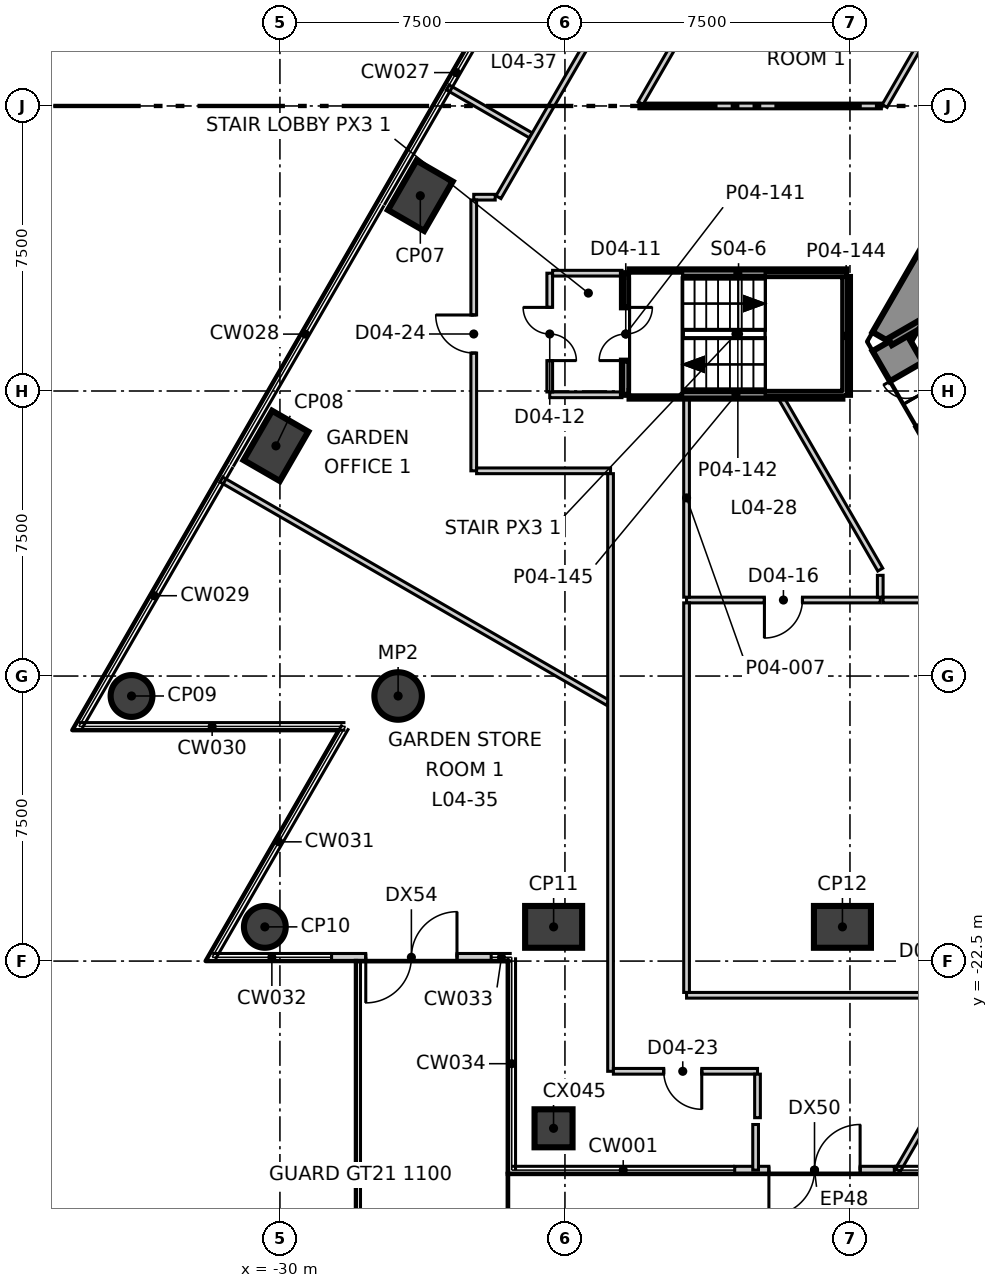
"""IFC4 building model, lengths in metres.
Left out: names, types, materials, properties, quantities, classifications, styles, units other than length and angle.
Written with IfcOpenShell. Run it as: python <this file> out.ifc"""

import sys

from ifc_helpers import new_model, si_unit, direction, frame, frame_2d, origin, origin_2d, place, context, subcontext, project, spatial, polyline, rectangle, circle, outline, extrude, element, fill, save


model = new_model("IFC4")
c1 = context("Model", 3, precision=1e-05, world=origin(), true_north=direction((0.0, 1.0)))
c2 = subcontext(c1, "Body", "Model", "MODEL_VIEW")
j1 = project(units=[si_unit("LENGTHUNIT", "METRE"), si_unit("PLANEANGLEUNIT", "RADIAN")], contexts=[c1])
p1 = place(None, origin())
s1 = spatial("IfcSite", under=j1, at=p1, CompositionType="ELEMENT")
p2 = place(p1, origin())
s2 = spatial("IfcBuilding", under=s1, at=p2, CompositionType="ELEMENT")
p3 = place(p2, frame((0.0, 0.0, 25.3)))
s3 = spatial("IfcBuildingStorey", under=s2, at=p3, CompositionType="ELEMENT", Elevation=25.3)
p4 = place(p3, frame((-1.617, 15.2, -0.4), z_axis=(0.0, 0.0, 1.0), x_axis=(-0.499992141631, -0.866029940768, 0.0)))
e1 = element("IfcWall", 1, at=p4, inside=s3, PredefinedType="SHEAR", context=c2, shape_type="SweptSolid", body=[
    extrude(outline(polyline([(-0.289, -0.499), (1.656, -0.499), (3.601, -0.499), (5.547, -0.499), (7.492, -0.499), (9.437, -0.5), (11.382, -0.5), (13.328, -0.5), (15.273, -0.5), (17.218, -0.5), (19.163, -0.5), (21.109, -0.5), (23.054, -0.5), (24.999, -0.5), (24.422, 0.5), (22.566, 0.5), (20.709, 0.5), (18.853, 0.5), (16.997, 0.5), (15.14, 0.5), (13.284, 0.5), (11.427, 0.5), (9.571, 0.5), (7.715, 0.5), (5.858, 0.5), (4.002, 0.5), (2.146, 0.5), (0.289, 0.5), (-0.289, -0.499)])), origin(), (0.0, 0.0, 1.0), 5.0),
])
p5 = place(p4, frame((11.805, 0.0, 0.4)))
e2 = element("IfcOpeningElement", 2, at=p5, cuts=e1, PredefinedType="OPENING", context=c2, shape_type="SweptSolid", body=[
    extrude(rectangle(XDim=1.1, YDim=2.1, at=frame_2d((0.55, 1.05))), frame((0.0, 0.51, 0.0), z_axis=(0.0, -1.0, 0.0), x_axis=(1.0, 0.0, 0.0)), (0.0, 0.0, 1.0), 1.02),
])
p6 = place(p3, frame((-13.972, -6.2, -0.4), z_axis=(0.0, 0.0, 1.0), x_axis=(0.500077567175, -0.865980615723, 0.0)))
e3 = element("IfcWall", 3, at=p6, inside=s3, PredefinedType="SHEAR", context=c2, shape_type="SweptSolid", body=[
    extrude(outline(polyline([(-0.289, -0.5), (1.616, -0.5), (3.522, -0.5), (2.944, 0.499), (1.617, 0.5), (0.289, 0.5), (-0.289, -0.5)])), origin(), (0.0, 0.0, 1.0), 5.0),
])
p7 = place(p6, frame((0.917, 0.0, 0.4)))
e4 = element("IfcOpeningElement", 4, at=p7, cuts=e3, PredefinedType="OPENING", context=c2, shape_type="SweptSolid", body=[
    extrude(rectangle(XDim=1.4, YDim=2.1, at=frame_2d((0.7, 1.05))), frame((0.0, 0.51, 0.0), z_axis=(0.0, -1.0, 0.0), x_axis=(1.0, 0.0, 0.0)), (0.0, 0.0, 1.0), 1.02),
])
for number, where, z_axis, x_axis in (
    (5, (-26.306, -2.362, -0.4), (0.0, 0.0, 1.0), (0.5, 0.866, 0.0)),
    (6, (-30.105, -8.944, -0.4), (0.0, 0.0, 1.0), (0.5, 0.866, 0.0)),
):
    element("IfcColumn", number, at=place(p3, frame(where, z_axis=z_axis, x_axis=x_axis)), inside=s3, PredefinedType="COLUMN", context=c2, shape_type="SweptSolid", body=[
        extrude(rectangle(XDim=1.5, YDim=1.1, at=origin_2d()), origin(), (0.0, 0.0, 1.0), 5.0),
    ])
for number, where, z_axis, x_axis in (
    (7, (-33.905, -15.525, -0.4), (0.0, 0.0, 1.0), (0.5, 0.866, 0.0)),
    (8, (-30.397, -21.6, -0.4), (0.0, 0.0, 1.0), (1.0, 0.0, 0.0)),
):
    element("IfcColumn", number, at=place(p3, frame(where, z_axis=z_axis, x_axis=x_axis)), inside=s3, PredefinedType="COLUMN", context=c2, shape_type="SweptSolid", body=[
        extrude(circle(Radius=0.55, at=origin_2d()), origin(), (0.0, 0.0, 1.0), 5.0),
    ])
for number, where, z_axis, x_axis in (
    (9, (-22.798, -21.6, -0.4), (0.0, 0.0, 1.0), (1.0, 0.0, 0.0)),
    (10, (-15.198, -21.6, -0.4), (0.0, 0.0, 1.0), (1.0, 0.0, 0.0)),
):
    element("IfcColumn", number, at=place(p3, frame(where, z_axis=z_axis, x_axis=x_axis)), inside=s3, PredefinedType="COLUMN", context=c2, shape_type="SweptSolid", body=[
        extrude(rectangle(XDim=1.5, YDim=1.1, at=origin_2d()), origin(), (0.0, 0.0, 1.0), 5.0),
    ])
p8 = place(p3, frame((-26.89, -15.525, -0.4), z_axis=(0.0, 0.0, 1.0), x_axis=(1.0, 0.0, 0.0)))
e11 = element("IfcColumn", 11, at=p8, inside=s3, PredefinedType="COLUMN", context=c2, shape_type="SweptSolid", body=[
    extrude(circle(Radius=0.625, at=origin_2d()), origin(), (0.0, 0.0, 1.0), 5.0),
])
p9 = place(p3, frame((-22.8, -26.9, -0.4), z_axis=(0.0, 0.0, 1.0), x_axis=(1.0, 0.0, 0.0)))
e12 = element("IfcColumn", 12, at=p9, inside=s3, PredefinedType="COLUMN", context=c2, shape_type="SweptSolid", body=[
    extrude(rectangle(XDim=1.0, YDim=1.0, at=origin_2d()), origin(), (0.0, 0.0, 1.0), 5.0),
])
p10 = place(p3, frame((-18.033, -28.0, 0.0), z_axis=(0.0, 0.0, 1.0), x_axis=(1.0, 0.0, 0.0)))
e13 = element("IfcWall", 13, at=p10, inside=s3, PredefinedType="ELEMENTEDWALL", context=c2, shape_type="SweptSolid", body=[
    extrude(rectangle(XDim=4.2, YDim=0.2, at=frame_2d((2.1, 0.0))), origin(), (0.0, 0.0, 1.0), 4.6),
])
p11 = place(p10, frame((0.9, 0.0, 0.0)))
e14 = element("IfcOpeningElement", 14, at=p11, cuts=e13, PredefinedType="OPENING", context=c2, shape_type="SweptSolid", body=[
    extrude(rectangle(XDim=2.4, YDim=2.4, at=frame_2d((1.2, 1.2))), frame((0.0, 0.11, 0.0), z_axis=(0.0, -1.0, 0.0), x_axis=(1.0, 0.0, 0.0)), (0.0, 0.0, 1.0), 0.22),
])
p12 = place(p3, frame((-28.641, -22.4, 0.0), z_axis=(0.0, 0.0, 1.0), x_axis=(1.0, 0.0, 0.0)))
e15 = element("IfcWall", 15, at=p12, inside=s3, PredefinedType="ELEMENTEDWALL", context=c2, shape_type="SweptSolid", body=[
    extrude(rectangle(XDim=4.2, YDim=0.2, at=frame_2d((2.1, 0.0))), origin(), (0.0, 0.0, 1.0), 4.6),
])
p13 = place(p12, frame((0.9, 0.0, 0.0)))
e16 = element("IfcOpeningElement", 16, at=p13, cuts=e15, PredefinedType="OPENING", context=c2, shape_type="SweptSolid", body=[
    extrude(rectangle(XDim=2.4, YDim=2.4, at=frame_2d((1.2, 1.2))), frame((0.0, 0.11, 0.0), z_axis=(0.0, -1.0, 0.0), x_axis=(1.0, 0.0, 0.0)), (0.0, 0.0, 1.0), 0.22),
])
p14 = place(p3, frame((-22.9, -7.6, 0.0), z_axis=(0.0, 0.0, 1.0), x_axis=(1.0, 0.0, 0.0)))
e17 = element("IfcWall", 17, at=p14, inside=s3, PredefinedType="PARTITIONING", context=c2, shape_type="SweptSolid", body=[
    extrude(rectangle(XDim=1.9, YDim=0.15, at=frame_2d((0.95, 0.0))), origin(), (0.0, 0.0, 1.0), 4.6),
])
p15 = place(p3, frame((-22.9, -7.525, 0.0), z_axis=(0.0, 0.0, 1.0), x_axis=(0.0, 1.0, 0.0)))
e18 = element("IfcWall", 18, at=p15, inside=s3, PredefinedType="PARTITIONING", context=c2, shape_type="SweptSolid", body=[
    extrude(rectangle(XDim=3.125, YDim=0.15, at=frame_2d((1.562, 0.0))), origin(), (0.0, 0.0, 1.0), 4.6),
])
p16 = place(p15, frame((0.825, 0.0, 0.0)))
e19 = element("IfcOpeningElement", 19, at=p16, cuts=e18, PredefinedType="OPENING", context=c2, shape_type="SweptSolid", body=[
    extrude(rectangle(XDim=1.4, YDim=2.1, at=frame_2d((0.7, 1.05))), frame((0.0, 0.085, 0.0), z_axis=(0.0, -1.0, 0.0), x_axis=(1.0, 0.0, 0.0)), (0.0, 0.0, 1.0), 0.17),
])
p17 = place(p3, frame((-22.825, -4.4, 0.0), z_axis=(0.0, 0.0, 1.0), x_axis=(1.0, 0.0, 0.0)))
e20 = element("IfcWall", 20, at=p17, inside=s3, PredefinedType="PARTITIONING", context=c2, shape_type="SweptSolid", body=[
    extrude(rectangle(XDim=1.825, YDim=0.15, at=frame_2d((0.913, 0.0))), origin(), (0.0, 0.0, 1.0), 4.6),
])
p18 = place(p3, frame((-19.3, -13.0, 0.0), z_axis=(0.0, 0.0, 1.0), x_axis=(1.0, 0.0, 0.0)))
e21 = element("IfcWall", 21, at=p18, inside=s3, PredefinedType="PARTITIONING", context=c2, shape_type="SweptSolid", body=[
    extrude(rectangle(XDim=5.097, YDim=0.15, at=frame_2d((2.549, 0.0))), origin(), (0.0, 0.0, 1.0), 4.6),
])
p19 = place(p18, frame((2.049, 0.0, 0.0)))
e22 = element("IfcOpeningElement", 22, at=p19, cuts=e21, PredefinedType="OPENING", context=c2, shape_type="SweptSolid", body=[
    extrude(rectangle(XDim=1.0, YDim=2.1, at=frame_2d((0.5, 1.05))), frame((0.0, 0.085, 0.0), z_axis=(0.0, -1.0, 0.0), x_axis=(1.0, 0.0, 0.0)), (0.0, 0.0, 1.0), 0.17),
])
p20 = place(p3, frame((-19.3, -12.925, 0.0), z_axis=(0.0, 0.0, 1.0), x_axis=(0.0, 1.0, 0.0)))
e23 = element("IfcWall", 23, at=p20, inside=s3, PredefinedType="PARTITIONING", context=c2, shape_type="SweptSolid", body=[
    extrude(rectangle(XDim=5.225, YDim=0.15, at=frame_2d((2.613, 0.0))), origin(), (0.0, 0.0, 1.0), 4.6),
])
p21 = place(p3, frame((-16.801, -7.7, 0.0), z_axis=(0.0, 0.0, 1.0), x_axis=(0.50000986103, -0.866019710441, 0.0)))
e24 = element("IfcWall", 24, at=p21, inside=s3, PredefinedType="PARTITIONING", context=c2, shape_type="SweptSolid", body=[
    extrude(rectangle(XDim=5.196, YDim=0.15, at=frame_2d((2.598, 0.0))), origin(), (0.0, 0.0, 1.0), 4.6),
])
p22 = place(p3, frame((-14.203, -12.925, 0.0), z_axis=(0.0, 0.0, 1.0), x_axis=(0.0, 1.0, 0.0)))
e25 = element("IfcWall", 25, at=p22, inside=s3, PredefinedType="PARTITIONING", context=c2, shape_type="SweptSolid", body=[
    extrude(rectangle(XDim=0.575, YDim=0.15, at=frame_2d((0.288, 0.0))), origin(), (0.0, 0.0, 1.0), 4.6),
])
p23 = place(p3, frame((-31.541, -9.83, 0.0), z_axis=(0.0, 0.0, 1.0), x_axis=(0.866006178148, -0.5000332983, 0.0)))
e26 = element("IfcWall", 26, at=p23, inside=s3, PredefinedType="PARTITIONING", context=c2, shape_type="SweptSolid", body=[
    extrude(rectangle(XDim=11.739, YDim=0.15, at=frame_2d((5.87, 0.0))), origin(), (0.0, 0.0, 1.0), 4.6),
])
p24 = place(p3, frame((-25.583, 0.488, 0.0), z_axis=(0.0, 0.0, 1.0), x_axis=(0.866050293573, -0.499956887143, 0.0)))
e27 = element("IfcWall", 27, at=p24, inside=s3, PredefinedType="PARTITIONING", context=c2, shape_type="SweptSolid", body=[
    extrude(rectangle(XDim=2.524, YDim=0.15, at=frame_2d((1.262, 0.0))), origin(), (0.0, 0.0, 1.0), 4.6),
])
p25 = place(p3, frame((-24.249, -2.4, 0.0), z_axis=(0.0, 0.0, 1.0), x_axis=(0.500030212684, 0.86600795978, 0.0)))
e28 = element("IfcWall", 28, at=p25, inside=s3, PredefinedType="PARTITIONING", context=c2, shape_type="SweptSolid", body=[
    extrude(rectangle(XDim=15.473, YDim=0.15, at=frame_2d((7.737, 0.0))), origin(), (0.0, 0.0, 1.0), 4.6),
])
p26 = place(p25, frame((9.334, 0.0, 0.0)))
e29 = element("IfcOpeningElement", 29, at=p26, cuts=e28, PredefinedType="OPENING", context=c2, shape_type="SweptSolid", body=[
    extrude(rectangle(XDim=1.0, YDim=2.1, at=frame_2d((0.5, 1.05))), frame((0.0, 0.085, 0.0), z_axis=(0.0, -1.0, 0.0), x_axis=(1.0, 0.0, 0.0)), (0.0, 0.0, 1.0), 0.17),
])
p27 = place(p3, frame((-24.9, -2.4, 0.0), z_axis=(0.0, 0.0, 1.0), x_axis=(1.0, 0.0, 0.0)))
e30 = element("IfcWall", 30, at=p27, inside=s3, PredefinedType="PARTITIONING", context=c2, shape_type="SweptSolid", body=[
    extrude(rectangle(XDim=0.565, YDim=0.15, at=frame_2d((0.282, 0.0))), origin(), (0.0, 0.0, 1.0), 4.0),
])
p28 = place(p3, frame((-24.9, -9.6, 0.0), z_axis=(0.0, 0.0, 1.0), x_axis=(0.0, 1.0, 0.0)))
e31 = element("IfcWall", 31, at=p28, inside=s3, PredefinedType="PARTITIONING", context=c2, shape_type="SweptSolid", body=[
    extrude(rectangle(XDim=7.125, YDim=0.15, at=frame_2d((3.562, 0.0))), origin(), (0.0, 0.0, 1.0), 4.6),
])
p29 = place(p28, frame((3.1, 0.0, 0.0)))
e32 = element("IfcOpeningElement", 32, at=p29, cuts=e31, PredefinedType="OPENING", context=c2, shape_type="SweptSolid", body=[
    extrude(rectangle(XDim=1.0, YDim=2.1, at=frame_2d((0.5, 1.05))), frame((0.0, 0.085, 0.0), z_axis=(0.0, -1.0, 0.0), x_axis=(1.0, 0.0, 0.0)), (0.0, 0.0, 1.0), 0.17),
])
p30 = place(p3, frame((-24.825, -9.6, 0.0), z_axis=(0.0, 0.0, 1.0), x_axis=(1.0, 0.0, 0.0)))
e33 = element("IfcWall", 33, at=p30, inside=s3, PredefinedType="PARTITIONING", context=c2, shape_type="SweptSolid", body=[
    extrude(rectangle(XDim=3.525, YDim=0.15, at=frame_2d((1.762, 0.0))), origin(), (0.0, 0.0, 1.0), 4.6),
])
p31 = place(p3, frame((-21.3, -25.4, 0.0), z_axis=(0.0, 0.0, 1.0), x_axis=(0.0, 1.0, 0.0)))
e34 = element("IfcWall", 34, at=p31, inside=s3, PredefinedType="PARTITIONING", context=c2, shape_type="SweptSolid", body=[
    extrude(rectangle(XDim=15.725, YDim=0.15, at=frame_2d((7.862, 0.0))), origin(), (0.0, 0.0, 1.0), 4.6),
])
p32 = place(p3, frame((-21.225, -25.4, 0.0), z_axis=(0.0, 0.0, 1.0), x_axis=(1.0, 0.0, 0.0)))
e35 = element("IfcWall", 35, at=p32, inside=s3, PredefinedType="PARTITIONING", context=c2, shape_type="SweptSolid", body=[
    extrude(rectangle(XDim=3.792, YDim=0.15, at=frame_2d((1.896, 0.0))), origin(), (0.0, 0.0, 1.0), 4.6),
])
p33 = place(p32, frame((1.325, 0.0, 0.0)))
e36 = element("IfcOpeningElement", 36, at=p33, cuts=e35, PredefinedType="OPENING", context=c2, shape_type="SweptSolid", body=[
    extrude(rectangle(XDim=1.0, YDim=2.1, at=frame_2d((0.5, 1.05))), frame((0.0, 0.085, 0.0), z_axis=(0.0, -1.0, 0.0), x_axis=(1.0, 0.0, 0.0)), (0.0, 0.0, 1.0), 0.17),
])
p34 = place(p3, frame((-17.433, -26.621, 0.0), z_axis=(0.0, 0.0, 1.0), x_axis=(0.0, 1.0, 0.0)))
e37 = element("IfcWall", 37, at=p34, inside=s3, PredefinedType="PARTITIONING", context=c2, shape_type="SweptSolid", body=[
    extrude(rectangle(XDim=1.146, YDim=0.15, at=frame_2d((0.573, 0.0))), origin(), (0.0, 0.0, 1.0), 4.6),
])
p35 = place(p3, frame((-17.483, -28.0, 0.0), z_axis=(0.0, 0.0, 1.0), x_axis=(0.0, 1.0, 0.0)))
e38 = element("IfcWall", 38, at=p35, inside=s3, PredefinedType="PARTITIONING", context=c2, shape_type="SweptSolid", body=[
    extrude(rectangle(XDim=1.2, YDim=0.15, at=frame_2d((0.6, 0.0))), origin(), (0.0, 0.0, 1.0), 4.6),
])
p36 = place(p3, frame((-14.13, -13.0, 0.0), z_axis=(0.0, 0.0, 1.0), x_axis=(1.0, 0.0, 0.0)))
e39 = element("IfcWall", 39, at=p36, inside=s3, PredefinedType="PARTITIONING", context=c2, shape_type="SweptSolid", body=[
    extrude(rectangle(XDim=10.13, YDim=0.15, at=frame_2d((5.065, 0.0))), origin(), (0.0, 0.0, 1.0), 4.6),
])
p37 = place(p3, frame((-19.3, -23.4, 0.0), z_axis=(0.0, 0.0, 1.0), x_axis=(1.0, 0.0, 0.0)))
e40 = element("IfcWall", 40, at=p37, inside=s3, PredefinedType="PARTITIONING", context=c2, shape_type="SweptSolid", body=[
    extrude(rectangle(XDim=15.225, YDim=0.15, at=frame_2d((7.613, 0.0))), origin(), (0.0, 0.0, 1.0), 4.6),
])
p38 = place(p37, frame((6.45, 0.0, 0.0)))
e41 = element("IfcOpeningElement", 41, at=p38, cuts=e40, PredefinedType="OPENING", context=c2, shape_type="SweptSolid", body=[
    extrude(rectangle(XDim=2.4, YDim=2.1, at=frame_2d((1.2, 1.05))), frame((0.0, 0.085, 0.0), z_axis=(0.0, -1.0, 0.0), x_axis=(1.0, 0.0, 0.0)), (0.0, 0.0, 1.0), 0.17),
])
p39 = place(p3, frame((-19.3, -23.325, 0.0), z_axis=(0.0, 0.0, 1.0), x_axis=(0.0, 1.0, 0.0)))
e42 = element("IfcWall", 42, at=p39, inside=s3, PredefinedType="PARTITIONING", context=c2, shape_type="SweptSolid", body=[
    extrude(rectangle(XDim=10.25, YDim=0.15, at=frame_2d((5.125, 0.0))), origin(), (0.0, 0.0, 1.0), 4.6),
])
p40 = place(p3, frame((-13.741, -28.0, 0.0), z_axis=(0.0, 0.0, 1.0), x_axis=(0.500065532695, 0.865987565159, 0.0)))
e43 = element("IfcWall", 43, at=p40, inside=s3, PredefinedType="PARTITIONING", context=c2, shape_type="SweptSolid", body=[
    extrude(rectangle(XDim=2.916, YDim=0.15, at=frame_2d((1.458, 0.0))), origin(), (0.0, 0.0, 1.0), 4.6),
])
p41 = place(p3, frame((-14.087, 0.0, 0.0), z_axis=(0.0, 0.0, 1.0), x_axis=(0.499907138174, 0.866079010947, 0.0)))
e44 = element("IfcWall", 44, at=p41, inside=s3, PredefinedType="PARTITIONING", context=c2, shape_type="SweptSolid", body=[
    extrude(rectangle(XDim=2.174, YDim=0.15, at=frame_2d((1.087, 0.0))), origin(), (0.0, 0.0, 1.0), 4.6),
])
p42 = place(p3, frame((-20.554, 0.0, 0.0), z_axis=(0.0, 0.0, 1.0), x_axis=(1.0, 0.0, 0.0)))
e45 = element("IfcWall", 45, at=p42, inside=s3, PredefinedType="PARTITIONING", context=c2, shape_type="SweptSolid", body=[
    extrude(rectangle(XDim=6.38, YDim=0.15, at=frame_2d((3.19, 0.0))), origin(), (0.0, 0.0, 1.0), 4.6),
])
p43 = place(p3, frame((-20.51, 0.075, 0.0), z_axis=(0.0, 0.0, 1.0), x_axis=(0.500014323953, 0.866017133688, 0.0)))
e46 = element("IfcWall", 46, at=p43, inside=s3, PredefinedType="PARTITIONING", context=c2, shape_type="SweptSolid", body=[
    extrude(rectangle(XDim=10.306, YDim=0.15, at=frame_2d((5.153, 0.0))), origin(), (0.0, 0.0, 1.0), 4.6),
])
p44 = place(p43, frame((4.609, 0.0, 0.0)))
e47 = element("IfcOpeningElement", 47, at=p44, cuts=e46, PredefinedType="OPENING", context=c2, shape_type="SweptSolid", body=[
    extrude(rectangle(XDim=1.0, YDim=2.1, at=frame_2d((0.5, 1.05))), frame((0.0, 0.085, 0.0), z_axis=(0.0, -1.0, 0.0), x_axis=(1.0, 0.0, 0.0)), (0.0, 0.0, 1.0), 0.17),
])
p45 = place(p3, frame((-13.946, -6.204, 0.0), z_axis=(0.0, 0.0, 1.0), x_axis=(0.866036527536, 0.499980732602, 0.0)))
e48 = element("IfcWall", 48, at=p45, inside=s3, PredefinedType="SOLIDWALL", context=c2, shape_type="SweptSolid", body=[
    extrude(rectangle(XDim=8.564, YDim=0.2, at=frame_2d((4.282, 0.0))), origin(), (0.0, 0.0, 1.0), 4.6),
])
p46 = place(p3, frame((-20.9, -7.6, 0.0), z_axis=(0.0, 0.0, 1.0), x_axis=(0.0, 1.0, 0.0)))
e49 = element("IfcWall", 49, at=p46, inside=s3, PredefinedType="SOLIDWALL", context=c2, shape_type="SweptSolid", body=[
    extrude(rectangle(XDim=3.2, YDim=0.2, at=frame_2d((1.6, 0.0))), origin(), (0.0, 0.0, 1.0), 4.6),
])
p47 = place(p46, frame((0.9, 0.0, 0.0)))
e50 = element("IfcOpeningElement", 50, at=p47, cuts=e49, PredefinedType="OPENING", context=c2, shape_type="SweptSolid", body=[
    extrude(rectangle(XDim=1.4, YDim=2.1, at=frame_2d((0.7, 1.05))), frame((0.0, 0.11, 0.0), z_axis=(0.0, -1.0, 0.0), x_axis=(1.0, 0.0, 0.0)), (0.0, 0.0, 1.0), 0.22),
])
p48 = place(p3, frame((-20.8, -4.4, 0.0), z_axis=(0.0, 0.0, 1.0), x_axis=(1.0, 0.0, 0.0)))
e51 = element("IfcWall", 51, at=p48, inside=s3, PredefinedType="SOLIDWALL", context=c2, shape_type="SweptSolid", body=[
    extrude(rectangle(XDim=5.7, YDim=0.2, at=frame_2d((2.85, 0.0))), origin(), (0.0, 0.0, 1.0), 4.6),
])
p49 = place(p3, frame((-15.1, -7.6, 0.0), z_axis=(0.0, 0.0, 1.0), x_axis=(0.0, 1.0, 0.0)))
e52 = element("IfcWall", 52, at=p49, inside=s3, PredefinedType="SOLIDWALL", context=c2, shape_type="SweptSolid", body=[
    extrude(rectangle(XDim=3.1, YDim=0.2, at=frame_2d((1.55, 0.0))), origin(), (0.0, 0.0, 1.0), 4.6),
])
p50 = place(p3, frame((-20.8, -7.6, 0.0), z_axis=(0.0, 0.0, 1.0), x_axis=(1.0, 0.0, 0.0)))
e53 = element("IfcWall", 53, at=p50, inside=s3, PredefinedType="SOLIDWALL", context=c2, shape_type="SweptSolid", body=[
    extrude(rectangle(XDim=5.6, YDim=0.2, at=frame_2d((2.8, 0.0))), origin(), (0.0, 0.0, 1.0), 4.6),
])
p51 = place(p11, frame((2.4, 0.0, 0.0), z_axis=(0.0, 0.0, 1.0), x_axis=(-1.0, 0.0, 0.0)))
e54 = element("IfcDoor", 54, at=p51, inside=s3, OperationType="DOUBLE_DOOR_SINGLE_SWING", PredefinedType="DOOR", context=c2, shape_type="SweptSolid", body=[
    extrude(rectangle(XDim=2.4, YDim=2.4, at=frame_2d((1.2, 1.2))), frame((0.0, 0.025, 0.0), z_axis=(0.0, -1.0, 0.0), x_axis=(1.0, 0.0, 0.0)), (0.0, 0.0, 1.0), 0.05),
])
fill(e14, e54)
p52 = place(p13, frame((2.4, 0.0, 0.0), z_axis=(0.0, 0.0, 1.0), x_axis=(-1.0, 0.0, 0.0)))
e55 = element("IfcDoor", 55, at=p52, inside=s3, OperationType="DOUBLE_DOOR_SINGLE_SWING", PredefinedType="DOOR", context=c2, shape_type="SweptSolid", body=[
    extrude(rectangle(XDim=2.4, YDim=2.4, at=frame_2d((1.2, 1.2))), frame((0.0, 0.025, 0.0), z_axis=(0.0, -1.0, 0.0), x_axis=(1.0, 0.0, 0.0)), (0.0, 0.0, 1.0), 0.05),
])
fill(e16, e55)
p53 = place(p47, origin())
e56 = element("IfcDoor", 56, at=p53, inside=s3, OperationType="DOUBLE_DOOR_SINGLE_SWING", PredefinedType="DOOR", context=c2, shape_type="SweptSolid", body=[
    extrude(rectangle(XDim=1.4, YDim=2.1, at=frame_2d((0.7, 1.05))), frame((0.0, 0.025, 0.0), z_axis=(0.0, -1.0, 0.0), x_axis=(1.0, 0.0, 0.0)), (0.0, 0.0, 1.0), 0.05),
])
fill(e50, e56)
p54 = place(p16, origin())
e57 = element("IfcDoor", 57, at=p54, inside=s3, OperationType="DOUBLE_DOOR_SINGLE_SWING", PredefinedType="DOOR", context=c2, shape_type="SweptSolid", body=[
    extrude(rectangle(XDim=1.4, YDim=2.1, at=frame_2d((0.7, 1.05))), frame((0.0, 0.025, 0.0), z_axis=(0.0, -1.0, 0.0), x_axis=(1.0, 0.0, 0.0)), (0.0, 0.0, 1.0), 0.05),
])
fill(e19, e57)
p55 = place(p19, origin())
e58 = element("IfcDoor", 58, at=p55, inside=s3, OperationType="SINGLE_SWING_LEFT", PredefinedType="DOOR", context=c2, shape_type="SweptSolid", body=[
    extrude(rectangle(XDim=1.0, YDim=2.1, at=frame_2d((0.5, 1.05))), frame((0.0, 0.025, 0.0), z_axis=(0.0, -1.0, 0.0), x_axis=(1.0, 0.0, 0.0)), (0.0, 0.0, 1.0), 0.05),
])
fill(e22, e58)
p56 = place(p33, origin())
e59 = element("IfcDoor", 59, at=p56, inside=s3, OperationType="SINGLE_SWING_RIGHT", PredefinedType="DOOR", context=c2, shape_type="SweptSolid", body=[
    extrude(rectangle(XDim=1.0, YDim=2.1, at=frame_2d((0.5, 1.05))), frame((0.0, 0.025, 0.0), z_axis=(0.0, -1.0, 0.0), x_axis=(1.0, 0.0, 0.0)), (0.0, 0.0, 1.0), 0.05),
])
fill(e36, e59)
p57 = place(p29, origin())
e60 = element("IfcDoor", 60, at=p57, inside=s3, OperationType="SINGLE_SWING_LEFT", PredefinedType="DOOR", context=c2, shape_type="SweptSolid", body=[
    extrude(rectangle(XDim=1.0, YDim=2.1, at=frame_2d((0.5, 1.05))), frame((0.0, 0.025, 0.0), z_axis=(0.0, -1.0, 0.0), x_axis=(1.0, 0.0, 0.0)), (0.0, 0.0, 1.0), 0.05),
])
fill(e32, e60)
p58 = place(p7, origin())
e61 = element("IfcDoor", 61, at=p58, inside=s3, OperationType="DOUBLE_DOOR_SINGLE_SWING", PredefinedType="DOOR", context=c2, shape_type="SweptSolid", body=[
    extrude(rectangle(XDim=1.4, YDim=2.1, at=frame_2d((0.7, 1.05))), frame((0.0, 0.025, 0.0), z_axis=(0.0, -1.0, 0.0), x_axis=(1.0, 0.0, 0.0)), (0.0, 0.0, 1.0), 0.05),
])
fill(e4, e61)
save(model, sys.argv[1])
